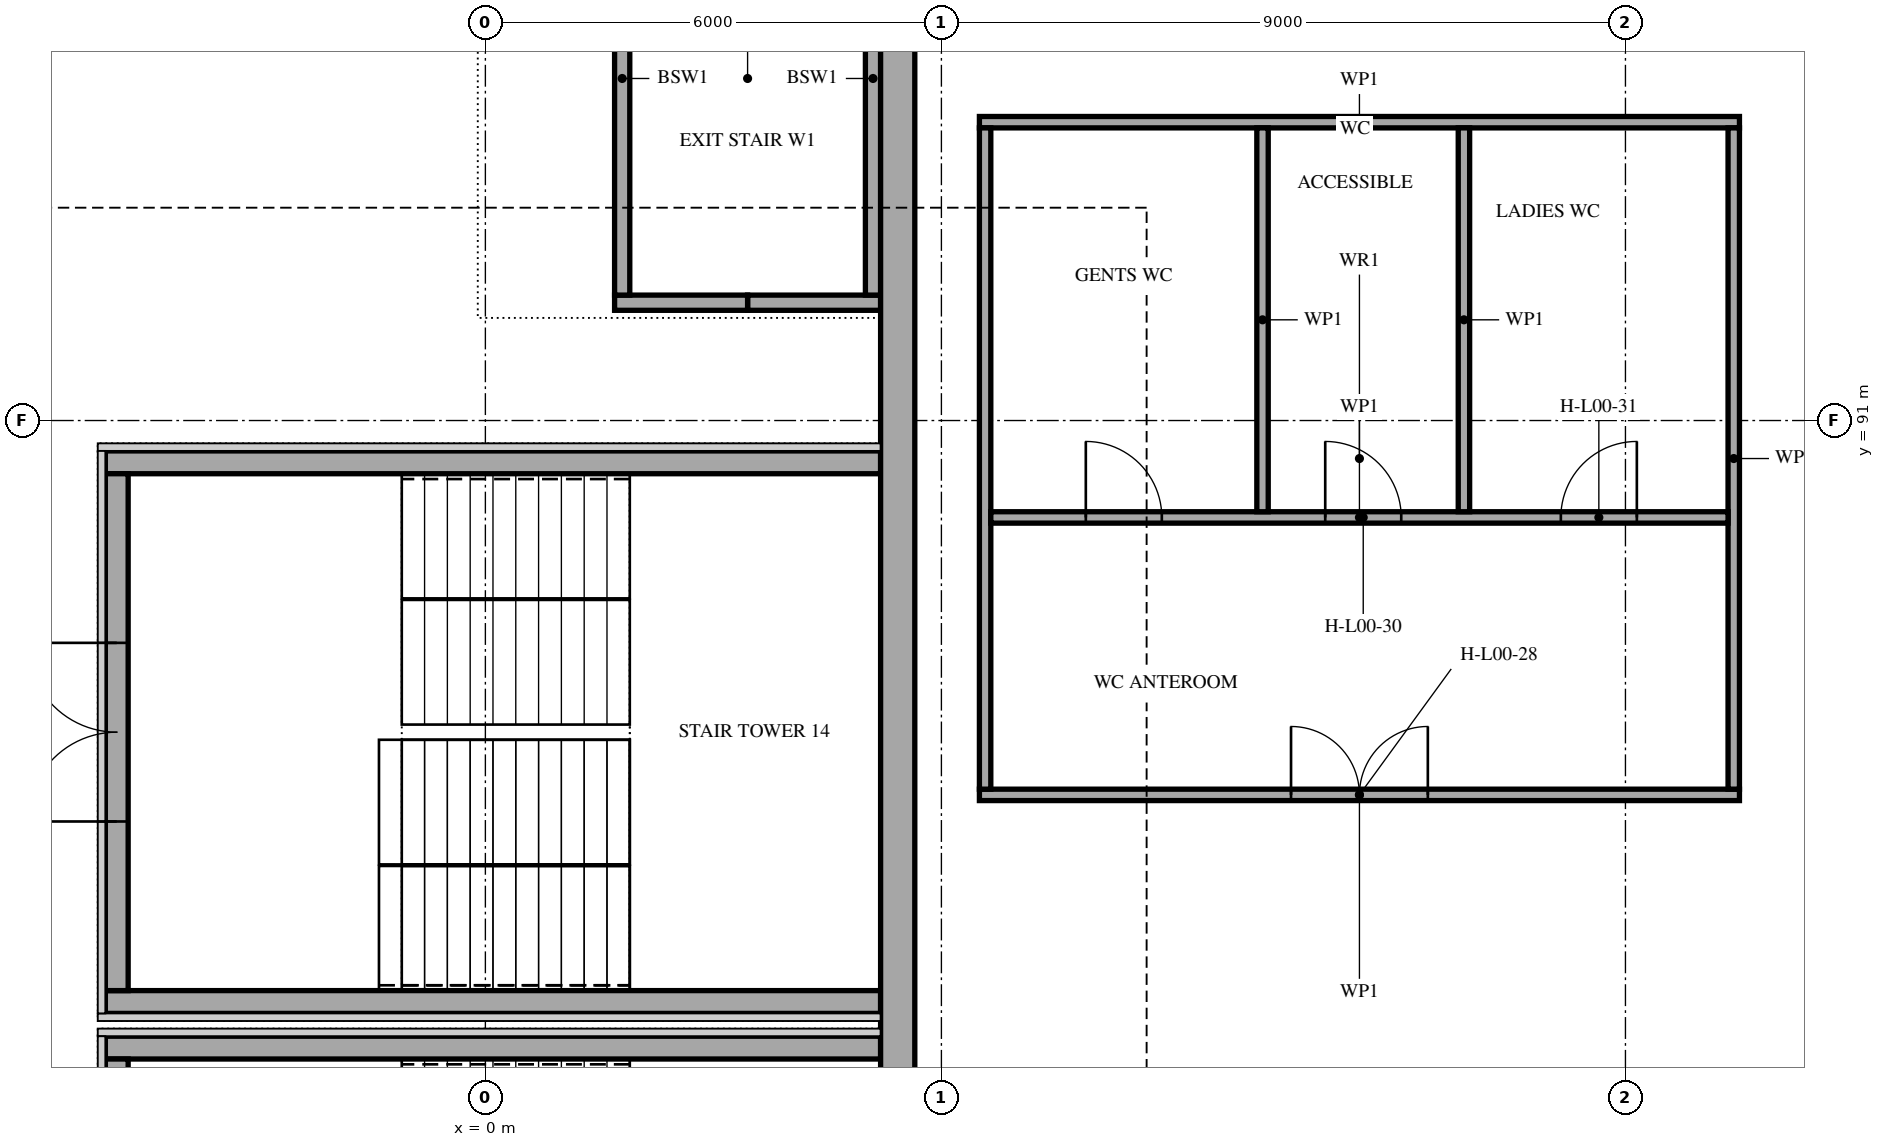
"""IFC4 building model, lengths in metres.
Left out: names, types, materials, properties, quantities, classifications, styles, units other than length and angle.
Written with IfcOpenShell. Run it as: python <this file> out.ifc"""

import sys

from ifc_helpers import new_model, si_unit, direction, frame, frame_2d, origin, place, context, subcontext, project, spatial, rectangle, extrude, element, fill, save


model = new_model("IFC4")
c1 = context("Model", 3, precision=1e-05, world=origin(), true_north=direction((0.0, 1.0)))
c2 = subcontext(c1, "Body", "Model", "MODEL_VIEW")
j1 = project(units=[si_unit("LENGTHUNIT", "METRE"), si_unit("PLANEANGLEUNIT", "RADIAN")], contexts=[c1])
p1 = place(None, origin())
s1 = spatial("IfcSite", under=j1, at=p1, CompositionType="ELEMENT")
p2 = place(p1, origin())
s2 = spatial("IfcBuilding", under=s1, at=p2, CompositionType="ELEMENT")
p3 = place(p2, origin())
s3 = spatial("IfcBuildingStorey", under=s2, at=p3, CompositionType="ELEMENT", Elevation=0.0)
p4 = place(p3, frame((5.2, 82.75, 0.0), z_axis=(0.0, 0.0, 1.0), x_axis=(-1.0, 0.0, 0.0)))
e1 = element("IfcWall", 1, at=p4, inside=s3, PredefinedType="SHEAR", context=c2, shape_type="SweptSolid", body=[
    extrude(rectangle(XDim=10.2, YDim=0.3, at=frame_2d((5.1, 0.0))), origin(), (0.0, 0.0, 1.0), 5.0),
])
p5 = place(p3, frame((-4.85, 75.8, 0.0), z_axis=(0.0, 0.0, 1.0), x_axis=(0.0, 1.0, 0.0)))
e2 = element("IfcWall", 2, at=p5, inside=s3, PredefinedType="SHEAR", context=c2, shape_type="SweptSolid", body=[
    extrude(rectangle(XDim=6.8, YDim=0.3, at=frame_2d((3.4, 0.0))), origin(), (0.0, 0.0, 1.0), 5.0),
])
p6 = place(p5, frame((2.225, 0.0, 0.0)))
e3 = element("IfcOpeningElement", 3, at=p6, cuts=e2, PredefinedType="OPENING", context=c2, shape_type="SweptSolid", body=[
    extrude(rectangle(XDim=2.35, YDim=2.1, at=frame_2d((1.175, 1.05))), frame((0.0, 0.16, 0.0), z_axis=(0.0, -1.0, 0.0), x_axis=(1.0, 0.0, 0.0)), (0.0, 0.0, 1.0), 0.32),
])
for number, where, z_axis, x_axis in (
    (4, (5.2, 83.35, 0.0), (0.0, 0.0, 1.0), (-1.0, 0.0, 0.0)),
    (5, (5.2, 90.45, 0.0), (0.0, 0.0, 1.0), (-1.0, 0.0, 0.0)),
):
    element("IfcWall", number, at=place(p3, frame(where, z_axis=z_axis, x_axis=x_axis)), inside=s3, PredefinedType="SHEAR", context=c2, shape_type="SweptSolid", body=[
        extrude(rectangle(XDim=10.2, YDim=0.3, at=frame_2d((5.1, 0.0))), origin(), (0.0, 0.0, 1.0), 5.0),
    ])
p7 = place(p3, frame((-4.85, 83.5, 0.0), z_axis=(0.0, 0.0, 1.0), x_axis=(0.0, 1.0, 0.0)))
e6 = element("IfcWall", 6, at=p7, inside=s3, PredefinedType="SHEAR", context=c2, shape_type="SweptSolid", body=[
    extrude(rectangle(XDim=6.8, YDim=0.3, at=frame_2d((3.4, 0.0))), origin(), (0.0, 0.0, 1.0), 5.0),
])
p8 = place(p7, frame((2.225, 0.0, 0.0)))
e7 = element("IfcOpeningElement", 7, at=p8, cuts=e6, PredefinedType="OPENING", context=c2, shape_type="SweptSolid", body=[
    extrude(rectangle(XDim=2.35, YDim=2.1, at=frame_2d((1.175, 1.05))), frame((0.0, 0.16, 0.0), z_axis=(0.0, -1.0, 0.0), x_axis=(1.0, 0.0, 0.0)), (0.0, 0.0, 1.0), 0.32),
])
for number, where, z_axis, x_axis in (
    (8, (5.2, 92.55, 0.0), (0.0, 0.0, 1.0), (-1.0, 0.0, 0.0)),
    (9, (3.45, 92.55, 0.0), (0.0, 0.0, 1.0), (-1.0, 0.0, 0.0)),
):
    element("IfcWall", number, at=place(p3, frame(where, z_axis=z_axis, x_axis=x_axis)), inside=s3, PredefinedType="SOLIDWALL", context=c2, shape_type="SweptSolid", body=[
        extrude(rectangle(XDim=1.75, YDim=0.2, at=frame_2d((0.875, 0.0))), origin(), (0.0, 0.0, 1.0), 3.2),
    ])
p9 = place(p3, frame((1.8, 98.35, 0.0), z_axis=(0.0, 0.0, 1.0), x_axis=(0.0, -1.0, 0.0)))
e10 = element("IfcWall", 10, at=p9, inside=s3, PredefinedType="SOLIDWALL", context=c2, shape_type="SweptSolid", body=[
    extrude(rectangle(XDim=5.7, YDim=0.2, at=frame_2d((2.85, 0.0))), origin(), (0.0, 0.0, 1.0), 3.2),
])
p10 = place(p9, frame((0.2, 0.0, 0.0)))
e11 = element("IfcOpeningElement", 11, at=p10, cuts=e10, PredefinedType="OPENING", context=c2, shape_type="SweptSolid", body=[
    extrude(rectangle(XDim=1.1, YDim=2.1, at=frame_2d((0.55, 1.05))), frame((0.0, 0.11, 0.0), z_axis=(0.0, -1.0, 0.0), x_axis=(1.0, 0.0, 0.0)), (0.0, 0.0, 1.0), 0.22),
])
p11 = place(p3, frame((5.1, 98.35, 0.0), z_axis=(0.0, 0.0, 1.0), x_axis=(0.0, -1.0, 0.0)))
e12 = element("IfcWall", 12, at=p11, inside=s3, PredefinedType="SOLIDWALL", context=c2, shape_type="SweptSolid", body=[
    extrude(rectangle(XDim=5.7, YDim=0.2, at=frame_2d((2.85, 0.0))), origin(), (0.0, 0.0, 1.0), 3.2),
])
p12 = place(p3, frame((5.425, 46.75, 0.0), z_axis=(0.0, 0.0, 1.0), x_axis=(0.0, 1.0, 0.0)))
e13 = element("IfcWall", 13, at=p12, inside=s3, PredefinedType="SOLIDWALL", context=c2, shape_type="SweptSolid", body=[
    extrude(rectangle(XDim=61.65, YDim=0.45, at=frame_2d((30.825, 0.0))), origin(), (0.0, 0.0, 1.0), 5.0),
])
p13 = place(p12, frame((5.95, 0.0, 0.0)))
e14 = element("IfcOpeningElement", 14, at=p13, cuts=e13, PredefinedType="OPENING", context=c2, shape_type="SweptSolid", body=[
    extrude(rectangle(XDim=1.2, YDim=2.1, at=frame_2d((0.6, 1.05))), frame((0.0, 0.235, 0.0), z_axis=(0.0, -1.0, 0.0), x_axis=(1.0, 0.0, 0.0)), (0.0, 0.0, 1.0), 0.47),
])
p14 = place(p3, frame((6.5, 86.075, 0.0), z_axis=(0.0, 0.0, 1.0), x_axis=(1.0, 0.0, 0.0)))
e15 = element("IfcWall", 15, at=p14, inside=s3, PredefinedType="SOLIDWALL", context=c2, shape_type="SweptSolid", body=[
    extrude(rectangle(XDim=10.0, YDim=0.15, at=frame_2d((5.0, 0.0))), origin(), (0.0, 0.0, 1.0), 3.45),
])
p15 = place(p14, frame((4.1, 0.0, 0.0)))
e16 = element("IfcOpeningElement", 16, at=p15, cuts=e15, PredefinedType="OPENING", context=c2, shape_type="SweptSolid", body=[
    extrude(rectangle(XDim=1.8, YDim=2.1, at=frame_2d((0.9, 1.05))), frame((0.0, 0.085, 0.0), z_axis=(0.0, -1.0, 0.0), x_axis=(1.0, 0.0, 0.0)), (0.0, 0.0, 1.0), 0.17),
])
p16 = place(p3, frame((6.5, 94.925, 0.0), z_axis=(0.0, 0.0, 1.0), x_axis=(1.0, 0.0, 0.0)))
e17 = element("IfcWall", 17, at=p16, inside=s3, PredefinedType="SOLIDWALL", context=c2, shape_type="SweptSolid", body=[
    extrude(rectangle(XDim=10.0, YDim=0.15, at=frame_2d((5.0, 0.0))), origin(), (0.0, 0.0, 1.0), 3.45),
])
for number, where, z_axis, x_axis in (
    (18, (6.575, 86.15, 0.0), (0.0, 0.0, 1.0), (0.0, 1.0, 0.0)),
    (19, (16.425, 86.15, 0.0), (0.0, 0.0, 1.0), (0.0, 1.0, 0.0)),
):
    element("IfcWall", number, at=place(p3, frame(where, z_axis=z_axis, x_axis=x_axis)), inside=s3, PredefinedType="SOLIDWALL", context=c2, shape_type="SweptSolid", body=[
        extrude(rectangle(XDim=8.7, YDim=0.15, at=frame_2d((4.35, 0.0))), origin(), (0.0, 0.0, 1.0), 3.45),
    ])
p17 = place(p3, frame((6.65, 89.725, 0.0), z_axis=(0.0, 0.0, 1.0), x_axis=(1.0, 0.0, 0.0)))
e20 = element("IfcWall", 20, at=p17, inside=s3, PredefinedType="SOLIDWALL", context=c2, shape_type="SweptSolid", body=[
    extrude(rectangle(XDim=9.7, YDim=0.15, at=frame_2d((4.85, 0.0))), origin(), (0.0, 0.0, 1.0), 3.45),
])
p18 = place(p17, frame((1.25, 0.0, 0.0)))
e21 = element("IfcOpeningElement", 21, at=p18, cuts=e20, PredefinedType="OPENING", context=c2, shape_type="SweptSolid", body=[
    extrude(rectangle(XDim=1.0, YDim=2.1, at=frame_2d((0.5, 1.05))), frame((0.0, 0.085, 0.0), z_axis=(0.0, -1.0, 0.0), x_axis=(1.0, 0.0, 0.0)), (0.0, 0.0, 1.0), 0.17),
])
p19 = place(p17, frame((4.4, 0.0, 0.0)))
e22 = element("IfcOpeningElement", 22, at=p19, cuts=e20, PredefinedType="OPENING", context=c2, shape_type="SweptSolid", body=[
    extrude(rectangle(XDim=1.0, YDim=2.1, at=frame_2d((0.5, 1.05))), frame((0.0, 0.085, 0.0), z_axis=(0.0, -1.0, 0.0), x_axis=(1.0, 0.0, 0.0)), (0.0, 0.0, 1.0), 0.17),
])
p20 = place(p17, frame((7.5, 0.0, 0.0)))
e23 = element("IfcOpeningElement", 23, at=p20, cuts=e20, PredefinedType="OPENING", context=c2, shape_type="SweptSolid", body=[
    extrude(rectangle(XDim=1.0, YDim=2.1, at=frame_2d((0.5, 1.05))), frame((0.0, 0.085, 0.0), z_axis=(0.0, -1.0, 0.0), x_axis=(1.0, 0.0, 0.0)), (0.0, 0.0, 1.0), 0.17),
])
for number, where, z_axis, x_axis in (
    (24, (10.225, 89.8, 0.0), (0.0, 0.0, 1.0), (0.0, 1.0, 0.0)),
    (25, (12.875, 89.8, 0.0), (0.0, 0.0, 1.0), (0.0, 1.0, 0.0)),
):
    element("IfcWall", number, at=place(p3, frame(where, z_axis=z_axis, x_axis=x_axis)), inside=s3, PredefinedType="SOLIDWALL", context=c2, shape_type="SweptSolid", body=[
        extrude(rectangle(XDim=5.05, YDim=0.15, at=frame_2d((2.525, 0.0))), origin(), (0.0, 0.0, 1.0), 3.45),
    ])
p21 = place(p8, origin())
e26 = element("IfcDoor", 26, at=p21, inside=s3, OperationType="DOUBLE_DOOR_SINGLE_SWING", PredefinedType="DOOR", context=c2, shape_type="SweptSolid", body=[
    extrude(rectangle(XDim=2.35, YDim=2.1, at=frame_2d((1.175, 1.05))), frame((0.0, 0.025, 0.0), z_axis=(0.0, -1.0, 0.0), x_axis=(1.0, 0.0, 0.0)), (0.0, 0.0, 1.0), 0.05),
])
fill(e7, e26)
p22 = place(p15, origin())
e27 = element("IfcDoor", 27, at=p22, inside=s3, OperationType="DOUBLE_DOOR_SINGLE_SWING", PredefinedType="DOOR", context=c2, shape_type="SweptSolid", body=[
    extrude(rectangle(XDim=1.8, YDim=2.1, at=frame_2d((0.9, 1.05))), frame((0.0, 0.025, 0.0), z_axis=(0.0, -1.0, 0.0), x_axis=(1.0, 0.0, 0.0)), (0.0, 0.0, 1.0), 0.05),
])
fill(e16, e27)
p23 = place(p18, origin())
e28 = element("IfcDoor", 28, at=p23, inside=s3, OperationType="SINGLE_SWING_LEFT", PredefinedType="DOOR", context=c2, shape_type="SweptSolid", body=[
    extrude(rectangle(XDim=1.0, YDim=2.1, at=frame_2d((0.5, 1.05))), frame((0.0, 0.025, 0.0), z_axis=(0.0, -1.0, 0.0), x_axis=(1.0, 0.0, 0.0)), (0.0, 0.0, 1.0), 0.05),
])
fill(e21, e28)
p24 = place(p19, origin())
e29 = element("IfcDoor", 29, at=p24, inside=s3, OperationType="SINGLE_SWING_LEFT", PredefinedType="DOOR", context=c2, shape_type="SweptSolid", body=[
    extrude(rectangle(XDim=1.0, YDim=2.1, at=frame_2d((0.5, 1.05))), frame((0.0, 0.025, 0.0), z_axis=(0.0, -1.0, 0.0), x_axis=(1.0, 0.0, 0.0)), (0.0, 0.0, 1.0), 0.05),
])
fill(e22, e29)
p25 = place(p20, origin())
e30 = element("IfcDoor", 30, at=p25, inside=s3, OperationType="SINGLE_SWING_RIGHT", PredefinedType="DOOR", context=c2, shape_type="SweptSolid", body=[
    extrude(rectangle(XDim=1.0, YDim=2.1, at=frame_2d((0.5, 1.05))), frame((0.0, 0.025, 0.0), z_axis=(0.0, -1.0, 0.0), x_axis=(1.0, 0.0, 0.0)), (0.0, 0.0, 1.0), 0.05),
])
fill(e23, e30)
save(model, sys.argv[1])
